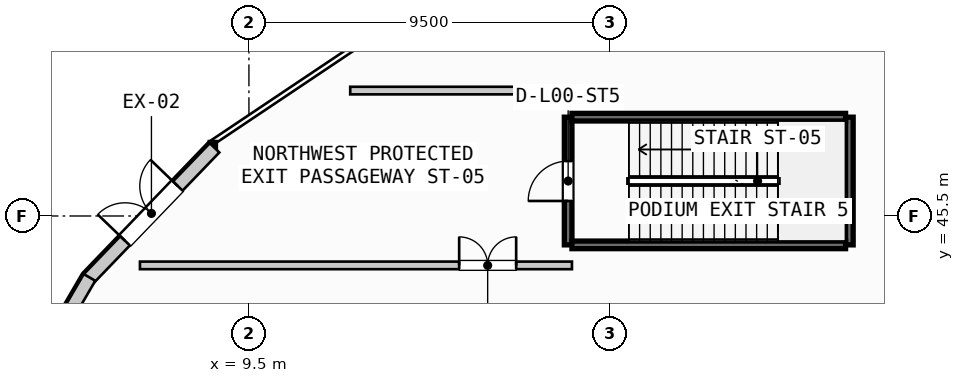
"""IFC4 building model, lengths in metres.
Left out: names, types, materials, properties, quantities, classifications, styles, units other than length and angle.
Written with IfcOpenShell. Run it as: python <this file> out.ifc"""

import sys

from ifc_helpers import new_model, si_unit, direction, frame, frame_2d, origin, place, context, subcontext, project, spatial, rectangle, extrude, source, transform, mapped, element, fill, save


model = new_model("IFC4")
c1 = context("Model", 3, precision=1e-05, world=origin(), true_north=direction((0.0, 1.0)))
c2 = subcontext(c1, "Body", "Model", "MODEL_VIEW")
j1 = project(units=[si_unit("LENGTHUNIT", "METRE"), si_unit("PLANEANGLEUNIT", "RADIAN")], contexts=[c1])
p1 = place(None, origin())
s1 = spatial("IfcSite", under=j1, at=p1, CompositionType="ELEMENT")
p2 = place(p1, origin())
s2 = spatial("IfcBuilding", under=s1, at=p2, CompositionType="ELEMENT")
p3 = place(p2, origin())
s3 = spatial("IfcBuildingStorey", under=s2, at=p3, CompositionType="ELEMENT", Elevation=0.0)
p4 = place(p3, frame((5.274, 43.841, 0.0), z_axis=(0.0, 0.0, 1.0), x_axis=(0.693368389068, 0.720583289455, 0.0)))
e1 = element("IfcWall", 1, at=p4, inside=s3, PredefinedType="SOLIDWALL", context=c2, shape_type="SweptSolid", body=[
    extrude(rectangle(XDim=4.791, YDim=0.35, at=frame_2d((2.395, 0.0))), origin(), (0.0, 0.0, 1.0), 4.95),
])
p5 = place(p4, frame((1.395, 0.0, 0.0)))
e2 = element("IfcOpeningElement", 2, at=p5, cuts=e1, PredefinedType="OPENING", context=c2, shape_type="SweptSolid", body=[
    extrude(rectangle(XDim=2.0, YDim=2.4, at=frame_2d((1.0, 1.2))), frame((0.0, 0.185, 0.0), z_axis=(0.0, -1.0, 0.0), x_axis=(1.0, 0.0, 0.0)), (0.0, 0.0, 1.0), 0.37),
])
p6 = place(p3, frame((2.915, 39.781, 0.0), z_axis=(0.0, 0.0, 1.0), x_axis=(0.503519292696, 0.863983982423, 0.0)))
e3 = element("IfcWall", 3, at=p6, inside=s3, PredefinedType="SOLIDWALL", context=c2, shape_type="SweptSolid", body=[
    extrude(rectangle(XDim=4.748, YDim=0.35, at=frame_2d((2.374, 0.0))), origin(), (0.0, 0.0, 1.0), 4.95),
])
p7 = place(p6, frame((1.374, 0.0, 0.0)))
e4 = element("IfcOpeningElement", 4, at=p7, cuts=e3, PredefinedType="OPENING", context=c2, shape_type="SweptSolid", body=[
    extrude(rectangle(XDim=2.0, YDim=2.4, at=frame_2d((1.0, 1.2))), frame((0.0, 0.185, 0.0), z_axis=(0.0, -1.0, 0.0), x_axis=(1.0, 0.0, 0.0)), (0.0, 0.0, 1.0), 0.37),
])
p8 = place(p3, frame((17.9, 44.74, 0.0), z_axis=(0.0, 0.0, 1.0), x_axis=(0.0, 1.0, 0.0)))
e5 = element("IfcWall", 5, at=p8, inside=s3, PredefinedType="SHEAR", context=c2, shape_type="SweptSolid", body=[
    extrude(rectangle(XDim=3.36, YDim=0.2, at=frame_2d((1.68, 0.0))), origin(), (0.0, 0.0, 1.0), 4.95),
])
p9 = place(p8, frame((1.155, 0.0, 0.0)))
e6 = element("IfcOpeningElement", 6, at=p9, cuts=e5, PredefinedType="OPENING", context=c2, shape_type="SweptSolid", body=[
    extrude(rectangle(XDim=1.05, YDim=2.15, at=frame_2d((0.525, 1.075))), frame((0.0, 0.11, 0.0), z_axis=(0.0, -1.0, 0.0), x_axis=(1.0, 0.0, 0.0)), (0.0, 0.0, 1.0), 0.22),
])
p10 = place(p3, frame((25.3, 48.1, 0.0), z_axis=(0.0, 0.0, 1.0), x_axis=(0.0, -1.0, 0.0)))
e7 = element("IfcWall", 7, at=p10, inside=s3, PredefinedType="SHEAR", context=c2, shape_type="SweptSolid", body=[
    extrude(rectangle(XDim=3.36, YDim=0.2, at=frame_2d((1.68, 0.0))), origin(), (0.0, 0.0, 1.0), 4.95),
])
for number, where, z_axis, x_axis in (
    (8, (25.2, 44.74, 0.0), (0.0, 0.0, 1.0), (-1.0, 0.0, 0.0)),
    (9, (18.0, 48.1, 0.0), (0.0, 0.0, 1.0), (1.0, 0.0, 0.0)),
):
    element("IfcWall", number, at=place(p3, frame(where, z_axis=z_axis, x_axis=x_axis)), inside=s3, PredefinedType="SHEAR", context=c2, shape_type="SweptSolid", body=[
        extrude(rectangle(XDim=7.2, YDim=0.2, at=frame_2d((3.6, 0.0))), origin(), (0.0, 0.0, 1.0), 4.95),
    ])
p11 = place(p3, frame((6.632, 44.2, 0.0), z_axis=(0.0, 0.0, 1.0), x_axis=(1.0, 0.0, 0.0)))
e10 = element("IfcWall", 10, at=p11, inside=s3, PredefinedType="PARTITIONING", context=c2, shape_type="SweptSolid", body=[
    extrude(rectangle(XDim=11.368, YDim=0.2, at=frame_2d((5.684, 0.0))), origin(), (0.0, 0.0, 1.0), 4.163),
])
p12 = place(p11, frame((8.4, 0.0, 0.0)))
e11 = element("IfcOpeningElement", 11, at=p12, cuts=e10, PredefinedType="OPENING", context=c2, shape_type="SweptSolid", body=[
    extrude(rectangle(XDim=1.5, YDim=2.2, at=frame_2d((0.75, 1.1))), frame((0.0, 0.11, 0.0), z_axis=(0.0, -1.0, 0.0), x_axis=(1.0, 0.0, 0.0)), (0.0, 0.0, 1.0), 0.22),
])
p13 = place(p3, frame((12.165, 48.8, 0.0), z_axis=(0.0, 0.0, 1.0), x_axis=(1.0, 0.0, 0.0)))
e12 = element("IfcWall", 12, at=p13, inside=s3, PredefinedType="PARTITIONING", context=c2, shape_type="SweptSolid", body=[
    extrude(rectangle(XDim=5.835, YDim=0.2, at=frame_2d((2.917, 0.0))), origin(), (0.0, 0.0, 1.0), 4.163),
])
m1 = source(origin(), c2, "Body", "SweptSolid", [
    extrude(rectangle(XDim=2.0, YDim=2.4, at=frame_2d((1.0, 1.2))), frame((0.0, 0.025, 0.0), z_axis=(0.0, -1.0, 0.0), x_axis=(1.0, 0.0, 0.0)), (0.0, 0.0, 1.0), 0.05),
])
p14 = place(p5, origin())
e13 = element("IfcDoor", 13, at=p14, inside=s3, OperationType="DOUBLE_DOOR_SINGLE_SWING", PredefinedType="DOOR", context=c2, shape_type="MappedRepresentation", body=[
    mapped(m1, transform((0.0, 0.0, 0.0), scale=1.0)),
])
fill(e2, e13)
m2 = source(origin(), c2, "Body", "SweptSolid", [
    extrude(rectangle(XDim=1.05, YDim=2.15, at=frame_2d((0.525, 1.075))), frame((0.0, 0.025, 0.0), z_axis=(0.0, -1.0, 0.0), x_axis=(1.0, 0.0, 0.0)), (0.0, 0.0, 1.0), 0.05),
])
p15 = place(p9, origin())
e14 = element("IfcDoor", 14, at=p15, inside=s3, OperationType="SINGLE_SWING_LEFT", PredefinedType="DOOR", context=c2, shape_type="MappedRepresentation", body=[
    mapped(m2, transform((0.0, 0.0, 0.0), scale=1.0)),
])
fill(e6, e14)
m3 = source(origin(), c2, "Body", "SweptSolid", [
    extrude(rectangle(XDim=1.5, YDim=2.2, at=frame_2d((0.75, 1.1))), frame((0.0, 0.025, 0.0), z_axis=(0.0, -1.0, 0.0), x_axis=(1.0, 0.0, 0.0)), (0.0, 0.0, 1.0), 0.05),
])
p16 = place(p12, origin())
e15 = element("IfcDoor", 15, at=p16, inside=s3, OperationType="DOUBLE_DOOR_SINGLE_SWING", PredefinedType="DOOR", context=c2, shape_type="MappedRepresentation", body=[
    mapped(m3, transform((0.0, 0.0, 0.0), scale=1.0)),
])
fill(e11, e15)
save(model, sys.argv[1])
